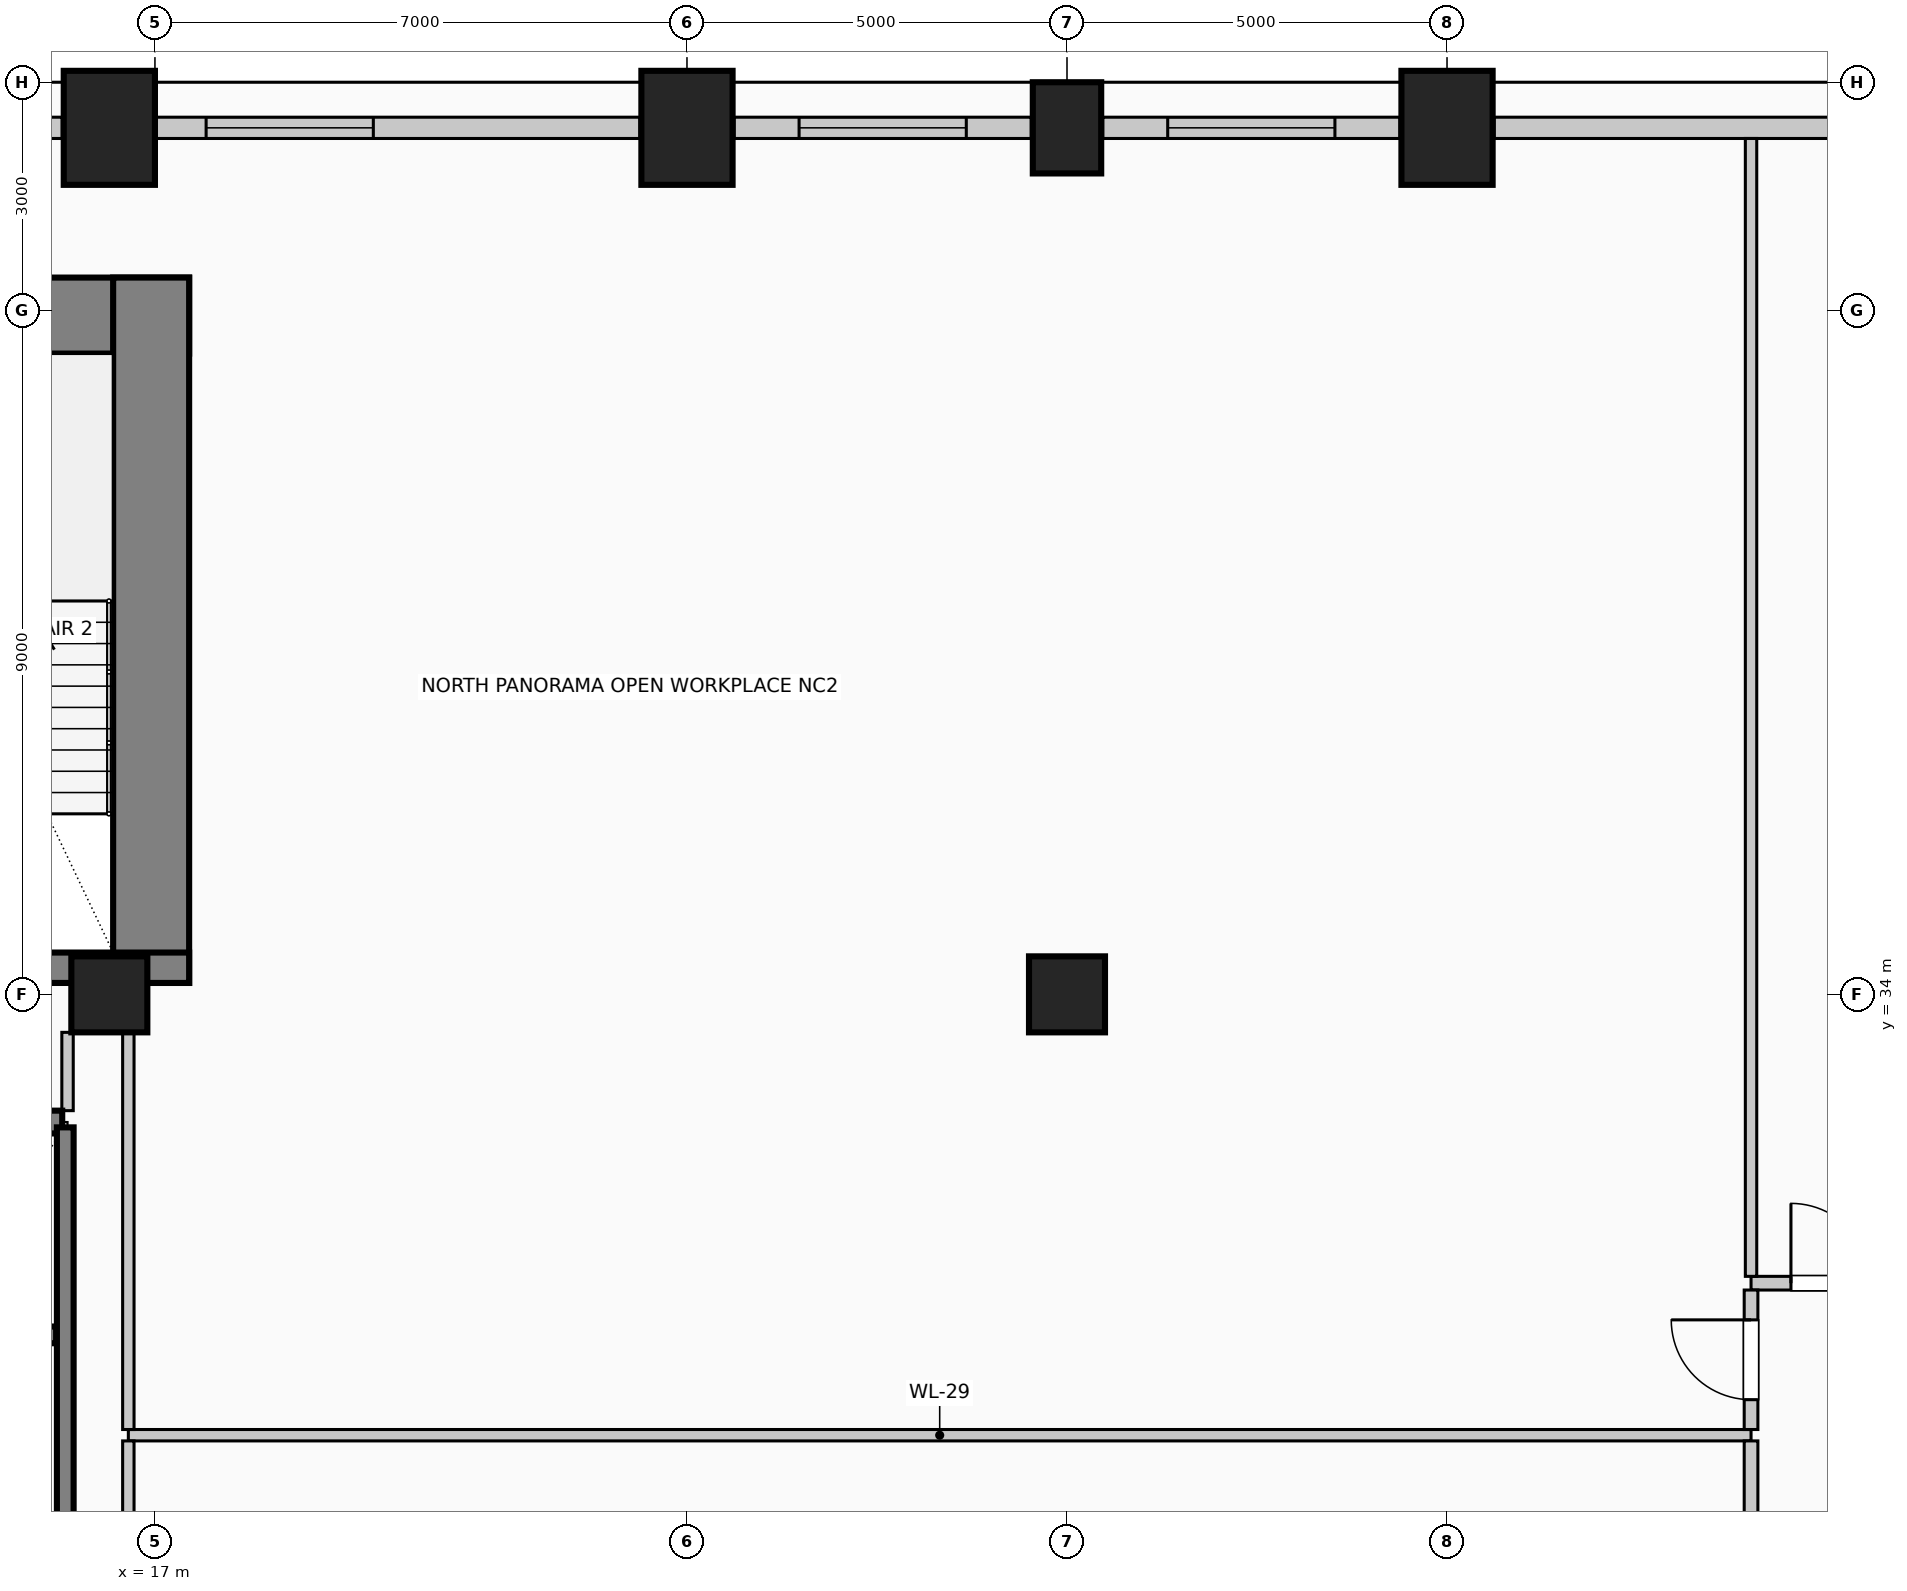
"""IFC4 building model, lengths in metres.
Left out: names, types, materials, properties, quantities, classifications, styles, units other than length and angle.
Written with IfcOpenShell. Run it as: python <this file> out.ifc"""

import sys

from ifc_helpers import new_model, si_unit, direction, frame, frame_2d, origin, origin_2d, place, context, subcontext, project, spatial, rectangle, circle, extrude, element, fill, save


model = new_model("IFC4")
c1 = context("Model", 3, precision=1e-05, world=origin(), true_north=direction((0.0, 1.0)))
c2 = subcontext(c1, "Body", "Model", "MODEL_VIEW")
j1 = project(units=[si_unit("LENGTHUNIT", "METRE"), si_unit("PLANEANGLEUNIT", "RADIAN")], contexts=[c1])
p1 = place(None, origin())
s1 = spatial("IfcSite", under=j1, at=p1, CompositionType="ELEMENT")
p2 = place(p1, origin())
s2 = spatial("IfcBuilding", under=s1, at=p2, CompositionType="ELEMENT")
p3 = place(p2, frame((0.0, 0.0, 74.6)))
s3 = spatial("IfcBuildingStorey", under=s2, at=p3, CompositionType="ELEMENT", Elevation=74.6)
p4 = place(p3, frame((2.55, 42.93, 0.0), z_axis=(0.0, 0.0, 1.0), x_axis=(1.0, 0.0, 0.0)))
e1 = element("IfcWall", 1, at=p4, inside=s3, PredefinedType="SHEAR", context=c2, shape_type="SweptSolid", body=[
    extrude(rectangle(XDim=14.9, YDim=1.0, at=frame_2d((7.45, 0.0))), origin(), (0.0, 0.0, 1.0), 4.0),
])
p5 = place(p3, frame((16.95, 34.15, 0.0), z_axis=(0.0, 0.0, 1.0), x_axis=(0.0, 1.0, 0.0)))
e2 = element("IfcWall", 2, at=p5, inside=s3, PredefinedType="SHEAR", context=c2, shape_type="SweptSolid", body=[
    extrude(rectangle(XDim=9.28, YDim=1.0, at=frame_2d((4.64, 0.0))), origin(), (0.0, 0.0, 1.0), 4.0),
])
p6 = place(p3, frame((12.29, 34.35, 0.0), z_axis=(0.0, 0.0, 1.0), x_axis=(1.0, 0.0, 0.0)))
e3 = element("IfcWall", 3, at=p6, inside=s3, PredefinedType="SHEAR", context=c2, shape_type="SweptSolid", body=[
    extrude(rectangle(XDim=5.16, YDim=0.4, at=frame_2d((2.58, 0.0))), origin(), (0.0, 0.0, 1.0), 4.0),
])
p7 = place(p6, frame((1.4, 0.0, 0.0)))
e4 = element("IfcOpeningElement", 4, at=p7, cuts=e3, PredefinedType="OPENING", context=c2, shape_type="SweptSolid", body=[
    extrude(rectangle(XDim=1.15, YDim=2.2, at=frame_2d((0.575, 1.1))), frame((0.0, 0.21, 0.0), z_axis=(0.0, -1.0, 0.0), x_axis=(1.0, 0.0, 0.0)), (0.0, 0.0, 1.0), 0.42),
])
for number, where, z_axis, x_axis in (
    (5, (16.4, 45.4, 0.0), (0.0, 0.0, 1.0), (1.0, 0.0, 0.0)),
    (6, (24.0, 45.4, 0.0), (0.0, 0.0, 1.0), (1.0, 0.0, 0.0)),
):
    element("IfcColumn", number, at=place(p3, frame(where, z_axis=z_axis, x_axis=x_axis)), inside=s3, PredefinedType="COLUMN", context=c2, shape_type="SweptSolid", body=[
        extrude(rectangle(XDim=1.2, YDim=1.5, at=origin_2d()), origin(), (0.0, 0.0, 1.0), 4.0),
    ])
p8 = place(p3, frame((29.0, 45.4, 0.0), z_axis=(0.0, 0.0, 1.0), x_axis=(1.0, 0.0, 0.0)))
e7 = element("IfcColumn", 7, at=p8, inside=s3, PredefinedType="COLUMN", context=c2, shape_type="SweptSolid", body=[
    extrude(rectangle(XDim=0.9, YDim=1.2, at=origin_2d()), origin(), (0.0, 0.0, 1.0), 4.0),
])
p9 = place(p3, frame((34.0, 45.4, 0.0), z_axis=(0.0, 0.0, 1.0), x_axis=(1.0, 0.0, 0.0)))
e8 = element("IfcColumn", 8, at=p9, inside=s3, PredefinedType="COLUMN", context=c2, shape_type="SweptSolid", body=[
    extrude(rectangle(XDim=1.2, YDim=1.5, at=origin_2d()), origin(), (0.0, 0.0, 1.0), 4.0),
])
for number, where, z_axis, x_axis in (
    (9, (16.4, 34.0, 0.0), (0.0, 0.0, 1.0), (1.0, 0.0, 0.0)),
    (10, (29.0, 34.0, 0.0), (0.0, 0.0, 1.0), (1.0, 0.0, 0.0)),
):
    element("IfcColumn", number, at=place(p3, frame(where, z_axis=z_axis, x_axis=x_axis)), inside=s3, PredefinedType="COLUMN", context=c2, shape_type="SweptSolid", body=[
        extrude(circle(Radius=0.5, at=origin_2d()), origin(), (0.0, 0.0, 1.0), 4.0),
    ])
p10 = place(p3, frame((14.47, 45.4, 0.0), z_axis=(0.0, 0.0, 1.0), x_axis=(1.0, 0.0, 0.0)))
e11 = element("IfcWall", 11, at=p10, inside=s3, PredefinedType="SOLIDWALL", context=c2, shape_type="SweptSolid", body=[
    extrude(rectangle(XDim=1.31, YDim=0.28, at=frame_2d((0.655, 0.0))), origin(), (0.0, 0.0, 1.0), 2.85),
])
p11 = place(p3, frame((17.02, 45.4, 0.0), z_axis=(0.0, 0.0, 1.0), x_axis=(1.0, 0.0, 0.0)))
e12 = element("IfcWall", 12, at=p11, inside=s3, PredefinedType="SOLIDWALL", context=c2, shape_type="SweptSolid", body=[
    extrude(rectangle(XDim=6.36, YDim=0.28, at=frame_2d((3.18, 0.0))), origin(), (0.0, 0.0, 1.0), 2.85),
])
p12 = place(p11, frame((0.653, 0.0, 0.5)))
e13 = element("IfcOpeningElement", 13, at=p12, cuts=e12, PredefinedType="OPENING", context=c2, shape_type="SweptSolid", body=[
    extrude(rectangle(XDim=2.2, YDim=1.95, at=frame_2d((1.1, 0.975))), frame((0.0, 0.15, 0.0), z_axis=(0.0, -1.0, 0.0), x_axis=(1.0, 0.0, 0.0)), (0.0, 0.0, 1.0), 0.3),
])
p13 = place(p3, frame((24.62, 45.4, 0.0), z_axis=(0.0, 0.0, 1.0), x_axis=(1.0, 0.0, 0.0)))
e14 = element("IfcWall", 14, at=p13, inside=s3, PredefinedType="SOLIDWALL", context=c2, shape_type="SweptSolid", body=[
    extrude(rectangle(XDim=3.91, YDim=0.28, at=frame_2d((1.955, 0.0))), origin(), (0.0, 0.0, 1.0), 2.85),
])
p14 = place(p13, frame((0.855, 0.0, 0.5)))
e15 = element("IfcOpeningElement", 15, at=p14, cuts=e14, PredefinedType="OPENING", context=c2, shape_type="SweptSolid", body=[
    extrude(rectangle(XDim=2.2, YDim=1.95, at=frame_2d((1.1, 0.975))), frame((0.0, 0.15, 0.0), z_axis=(0.0, -1.0, 0.0), x_axis=(1.0, 0.0, 0.0)), (0.0, 0.0, 1.0), 0.3),
])
p15 = place(p3, frame((29.47, 45.4, 0.0), z_axis=(0.0, 0.0, 1.0), x_axis=(1.0, 0.0, 0.0)))
e16 = element("IfcWall", 16, at=p15, inside=s3, PredefinedType="SOLIDWALL", context=c2, shape_type="SweptSolid", body=[
    extrude(rectangle(XDim=3.91, YDim=0.28, at=frame_2d((1.955, 0.0))), origin(), (0.0, 0.0, 1.0), 2.85),
])
p16 = place(p15, frame((0.855, 0.0, 0.5)))
e17 = element("IfcOpeningElement", 17, at=p16, cuts=e16, PredefinedType="OPENING", context=c2, shape_type="SweptSolid", body=[
    extrude(rectangle(XDim=2.2, YDim=1.95, at=frame_2d((1.1, 0.975))), frame((0.0, 0.15, 0.0), z_axis=(0.0, -1.0, 0.0), x_axis=(1.0, 0.0, 0.0)), (0.0, 0.0, 1.0), 0.3),
])
p17 = place(p3, frame((34.62, 45.4, 0.0), z_axis=(0.0, 0.0, 1.0), x_axis=(1.0, 0.0, 0.0)))
e18 = element("IfcWall", 18, at=p17, inside=s3, PredefinedType="SOLIDWALL", context=c2, shape_type="SweptSolid", body=[
    extrude(rectangle(XDim=6.36, YDim=0.28, at=frame_2d((3.18, 0.0))), origin(), (0.0, 0.0, 1.0), 2.85),
])
p18 = place(p3, frame((14.0, 32.32, 0.0), z_axis=(0.0, 0.0, 1.0), x_axis=(1.0, 0.0, 0.0)))
e19 = element("IfcWall", 19, at=p18, inside=s3, PredefinedType="SOLIDWALL", context=c2, shape_type="SweptSolid", body=[
    extrude(rectangle(XDim=1.78, YDim=0.3, at=frame_2d((0.89, 0.0))), origin(), (0.0, 0.0, 1.0), 4.0),
])
p19 = place(p3, frame((15.82, 26.8, 0.0), z_axis=(0.0, 0.0, 1.0), x_axis=(0.0, 1.0, 0.0)))
e20 = element("IfcWall", 20, at=p19, inside=s3, PredefinedType="SOLIDWALL", context=c2, shape_type="SweptSolid", body=[
    extrude(rectangle(XDim=5.45, YDim=0.22, at=frame_2d((2.725, 0.0))), origin(), (0.0, 0.0, 1.0), 4.0),
])
p20 = place(p3, frame((12.3, 29.52, 0.0), z_axis=(0.0, 0.0, 1.0), x_axis=(1.0, 0.0, 0.0)))
e21 = element("IfcWall", 21, at=p20, inside=s3, PredefinedType="SOLIDWALL", context=c2, shape_type="SweptSolid", body=[
    extrude(rectangle(XDim=3.4, YDim=0.22, at=frame_2d((1.7, 0.0))), origin(), (0.0, 0.0, 1.0), 4.0),
])
p21 = place(p3, frame((16.65, 28.2, 0.0), z_axis=(0.0, 0.0, 1.0), x_axis=(1.0, 0.0, 0.0)))
e22 = element("IfcWall", 22, at=p21, inside=s3, PredefinedType="PARTITIONING", context=c2, shape_type="SweptSolid", body=[
    extrude(rectangle(XDim=21.35, YDim=0.15, at=frame_2d((10.675, 0.0))), origin(), (0.0, 0.0, 1.0), 3.7),
])
p22 = place(p3, frame((38.0, 30.2, 0.0), z_axis=(0.0, 0.0, 1.0), x_axis=(1.0, 0.0, 0.0)))
e23 = element("IfcWall", 23, at=p22, inside=s3, PredefinedType="PARTITIONING", context=c2, shape_type="SweptSolid", body=[
    extrude(rectangle(XDim=2.1, YDim=0.18, at=frame_2d((1.05, 0.0))), origin(), (0.0, 0.0, 1.0), 3.7),
])
p23 = place(p22, frame((0.525, 0.0, 0.0)))
e24 = element("IfcOpeningElement", 24, at=p23, cuts=e23, PredefinedType="OPENING", context=c2, shape_type="SweptSolid", body=[
    extrude(rectangle(XDim=1.05, YDim=2.15, at=frame_2d((0.525, 1.075))), frame((0.0, 0.1, 0.0), z_axis=(0.0, -1.0, 0.0), x_axis=(1.0, 0.0, 0.0)), (0.0, 0.0, 1.0), 0.2),
])
p24 = place(p3, frame((15.85, 32.47, 0.0), z_axis=(0.0, 0.0, 1.0), x_axis=(0.0, 1.0, 0.0)))
e25 = element("IfcWall", 25, at=p24, inside=s3, PredefinedType="PARTITIONING", context=c2, shape_type="SweptSolid", body=[
    extrude(rectangle(XDim=1.03, YDim=0.15, at=frame_2d((0.515, 0.0))), origin(), (0.0, 0.0, 1.0), 3.7),
])
p25 = place(p3, frame((16.65, 20.29, 0.0), z_axis=(0.0, 0.0, 1.0), x_axis=(0.0, 1.0, 0.0)))
e26 = element("IfcWall", 26, at=p25, inside=s3, PredefinedType="PARTITIONING", context=c2, shape_type="SweptSolid", body=[
    extrude(rectangle(XDim=7.835, YDim=0.15, at=frame_2d((3.917, 0.0))), origin(), (0.0, 0.0, 1.0), 2.995),
])
p26 = place(p3, frame((16.65, 28.275, 0.0), z_axis=(0.0, 0.0, 1.0), x_axis=(0.0, 1.0, 0.0)))
e27 = element("IfcWall", 27, at=p26, inside=s3, PredefinedType="PARTITIONING", context=c2, shape_type="SweptSolid", body=[
    extrude(rectangle(XDim=5.225, YDim=0.15, at=frame_2d((2.613, 0.0))), origin(), (0.0, 0.0, 1.0), 2.995),
])
p27 = place(p3, frame((38.0, 20.29, 0.0), z_axis=(0.0, 0.0, 1.0), x_axis=(0.0, 1.0, 0.0)))
e28 = element("IfcWall", 28, at=p27, inside=s3, PredefinedType="PARTITIONING", context=c2, shape_type="SweptSolid", body=[
    extrude(rectangle(XDim=7.835, YDim=0.18, at=frame_2d((3.917, 0.0))), origin(), (0.0, 0.0, 1.0), 3.7),
])
p28 = place(p3, frame((38.0, 28.275, 0.0), z_axis=(0.0, 0.0, 1.0), x_axis=(0.0, 1.0, 0.0)))
e29 = element("IfcWall", 29, at=p28, inside=s3, PredefinedType="PARTITIONING", context=c2, shape_type="SweptSolid", body=[
    extrude(rectangle(XDim=1.835, YDim=0.18, at=frame_2d((0.917, 0.0))), origin(), (0.0, 0.0, 1.0), 3.7),
])
p29 = place(p28, frame((0.393, 0.0, 0.0)))
e30 = element("IfcOpeningElement", 30, at=p29, cuts=e29, PredefinedType="OPENING", context=c2, shape_type="SweptSolid", body=[
    extrude(rectangle(XDim=1.05, YDim=2.15, at=frame_2d((0.525, 1.075))), frame((0.0, 0.1, 0.0), z_axis=(0.0, -1.0, 0.0), x_axis=(1.0, 0.0, 0.0)), (0.0, 0.0, 1.0), 0.2),
])
p30 = place(p3, frame((38.0, 30.29, 0.0), z_axis=(0.0, 0.0, 1.0), x_axis=(0.0, 1.0, 0.0)))
e31 = element("IfcWall", 31, at=p30, inside=s3, PredefinedType="PARTITIONING", context=c2, shape_type="SweptSolid", body=[
    extrude(rectangle(XDim=14.97, YDim=0.15, at=frame_2d((7.485, 0.0))), origin(), (0.0, 0.0, 1.0), 3.7),
])
p31 = place(p12, origin())
e32 = element("IfcWindow", 32, at=p31, inside=s3, PartitioningType="SINGLE_PANEL", PredefinedType="WINDOW", context=c2, shape_type="SweptSolid", body=[
    extrude(rectangle(XDim=2.2, YDim=1.95, at=frame_2d((1.1, 0.975))), frame((0.0, 0.03, 0.0), z_axis=(0.0, -1.0, 0.0), x_axis=(1.0, 0.0, 0.0)), (0.0, 0.0, 1.0), 0.06),
])
fill(e13, e32)
p32 = place(p14, origin())
e33 = element("IfcWindow", 33, at=p32, inside=s3, PartitioningType="SINGLE_PANEL", PredefinedType="WINDOW", context=c2, shape_type="SweptSolid", body=[
    extrude(rectangle(XDim=2.2, YDim=1.95, at=frame_2d((1.1, 0.975))), frame((0.0, 0.03, 0.0), z_axis=(0.0, -1.0, 0.0), x_axis=(1.0, 0.0, 0.0)), (0.0, 0.0, 1.0), 0.06),
])
fill(e15, e33)
p33 = place(p16, origin())
e34 = element("IfcWindow", 34, at=p33, inside=s3, PartitioningType="SINGLE_PANEL", PredefinedType="WINDOW", context=c2, shape_type="SweptSolid", body=[
    extrude(rectangle(XDim=2.2, YDim=1.95, at=frame_2d((1.1, 0.975))), frame((0.0, 0.03, 0.0), z_axis=(0.0, -1.0, 0.0), x_axis=(1.0, 0.0, 0.0)), (0.0, 0.0, 1.0), 0.06),
])
fill(e17, e34)
p34 = place(p23, origin())
e35 = element("IfcDoor", 35, at=p34, inside=s3, OperationType="SINGLE_SWING_LEFT", PredefinedType="DOOR", context=c2, shape_type="SweptSolid", body=[
    extrude(rectangle(XDim=1.05, YDim=2.15, at=frame_2d((0.525, 1.075))), frame((0.0, 0.025, 0.0), z_axis=(0.0, -1.0, 0.0), x_axis=(1.0, 0.0, 0.0)), (0.0, 0.0, 1.0), 0.05),
])
fill(e24, e35)
p35 = place(p29, origin())
e36 = element("IfcDoor", 36, at=p35, inside=s3, OperationType="SINGLE_SWING_RIGHT", PredefinedType="DOOR", context=c2, shape_type="SweptSolid", body=[
    extrude(rectangle(XDim=1.05, YDim=2.15, at=frame_2d((0.525, 1.075))), frame((0.0, 0.025, 0.0), z_axis=(0.0, -1.0, 0.0), x_axis=(1.0, 0.0, 0.0)), (0.0, 0.0, 1.0), 0.05),
])
fill(e30, e36)
save(model, sys.argv[1])
